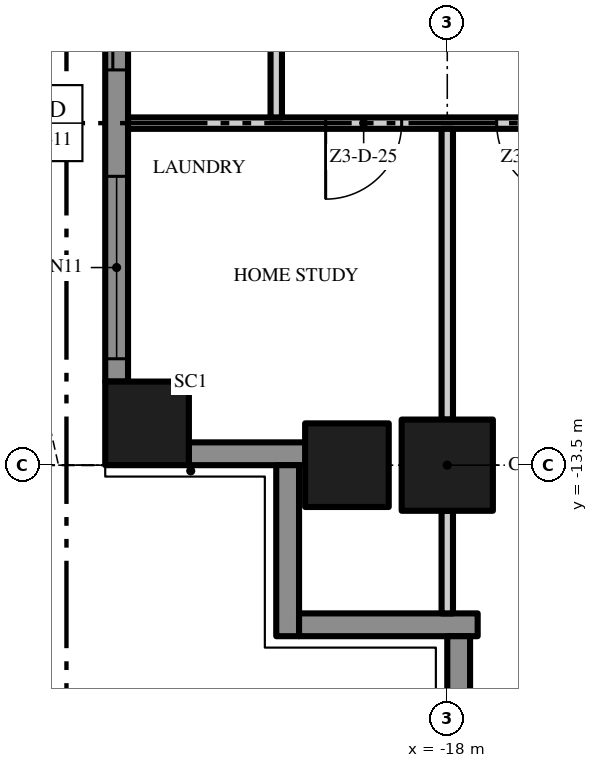
"""IFC4 building model, lengths in metres.
Left out: names, types, materials, properties, quantities, classifications, styles, units other than length and angle.
Written with IfcOpenShell. Run it as: python <this file> out.ifc"""

import sys

from ifc_helpers import new_model, si_unit, direction, frame, frame_2d, origin, origin_2d, place, context, subcontext, project, spatial, polyline, rectangle, outline, extrude, element, fill, save


model = new_model("IFC4")
c1 = context("Model", 3, precision=1e-05, world=origin(), true_north=direction((0.0, 1.0)))
c2 = subcontext(c1, "Body", "Model", "MODEL_VIEW")
j1 = project(units=[si_unit("LENGTHUNIT", "METRE"), si_unit("PLANEANGLEUNIT", "RADIAN")], contexts=[c1])
p1 = place(None, origin())
s1 = spatial("IfcSite", under=j1, at=p1, CompositionType="ELEMENT")
p2 = place(p1, origin())
s2 = spatial("IfcBuilding", under=s1, at=p2, CompositionType="ELEMENT")
p3 = place(p2, frame((0.0, 0.0, 163.0)))
s3 = spatial("IfcBuildingStorey", under=s2, at=p3, CompositionType="ELEMENT", Elevation=163.0)
p4 = place(p3, frame((-18.0, -13.5, 0.0), z_axis=(0.0, 0.0, 1.0), x_axis=(1.0, 0.0, 0.0)))
e1 = element("IfcColumn", 1, at=p4, inside=s3, PredefinedType="COLUMN", context=c2, shape_type="SweptSolid", body=[
    extrude(rectangle(XDim=1.2, YDim=1.2, at=origin_2d()), origin(), (0.0, 0.0, 1.0), 3.5),
])
for number, where, z_axis, x_axis in (
    (2, (-21.95, -12.95, 0.0), (0.0, 0.0, 1.0), (1.0, 0.0, 0.0)),
    (3, (-19.32, -13.5, 0.0), (0.0, 0.0, 1.0), (1.0, 0.0, 0.0)),
):
    element("IfcColumn", number, at=place(p3, frame(where, z_axis=z_axis, x_axis=x_axis)), inside=s3, PredefinedType="COLUMN", context=c2, shape_type="SweptSolid", body=[
        extrude(rectangle(XDim=1.1, YDim=1.1, at=origin_2d()), origin(), (0.0, 0.0, 1.0), 3.5),
    ])
p5 = place(p3, frame((-22.35, -12.4, 0.0), z_axis=(0.0, 0.0, 1.0), x_axis=(0.0, 1.0, 0.0)))
e4 = element("IfcWall", 4, at=p5, inside=s3, PredefinedType="SOLIDWALL", context=c2, shape_type="SweptSolid", body=[
    extrude(rectangle(XDim=7.35, YDim=0.3, at=frame_2d((3.675, 0.0))), origin(), (0.0, 0.0, 1.0), 3.5),
])
p6 = place(p5, frame((4.1, 0.0, 0.0)))
e5 = element("IfcOpeningElement", 5, at=p6, cuts=e4, PredefinedType="OPENING", context=c2, shape_type="SweptSolid", body=[
    extrude(rectangle(XDim=2.95, YDim=2.4, at=frame_2d((1.475, 1.2))), frame((0.0, 0.16, 0.0), z_axis=(0.0, -1.0, 0.0), x_axis=(1.0, 0.0, 0.0)), (0.0, 0.0, 1.0), 0.32),
])
p7 = place(p5, frame((0.3, 0.0, 0.45)))
e6 = element("IfcOpeningElement", 6, at=p7, cuts=e4, PredefinedType="OPENING", context=c2, shape_type="SweptSolid", body=[
    extrude(rectangle(XDim=2.4, YDim=2.65, at=frame_2d((1.2, 1.325))), frame((0.0, 0.16, 0.0), z_axis=(0.0, -1.0, 0.0), x_axis=(1.0, 0.0, 0.0)), (0.0, 0.0, 1.0), 0.32),
])
p8 = place(p3, frame((-19.85, -13.35, 0.0), z_axis=(0.0, 0.0, 1.0), x_axis=(-1.0, 0.0, 0.0)))
e7 = element("IfcWall", 7, at=p8, inside=s3, PredefinedType="SOLIDWALL", context=c2, shape_type="SweptSolid", body=[
    extrude(rectangle(XDim=1.55, YDim=0.3, at=frame_2d((0.775, 0.0))), origin(), (0.0, 0.0, 1.0), 3.5),
])
p9 = place(p3, frame((-20.1, -15.75, 0.0), z_axis=(0.0, 0.0, 1.0), x_axis=(0.0, 1.0, 0.0)))
e8 = element("IfcWall", 8, at=p9, inside=s3, PredefinedType="SOLIDWALL", context=c2, shape_type="SweptSolid", body=[
    extrude(rectangle(XDim=2.25, YDim=0.3, at=frame_2d((1.125, 0.0))), origin(), (0.0, 0.0, 1.0), 3.5),
])
p10 = place(p3, frame((-17.6, -15.6, 0.0), z_axis=(0.0, 0.0, 1.0), x_axis=(-1.0, 0.0, 0.0)))
e9 = element("IfcWall", 9, at=p10, inside=s3, PredefinedType="SOLIDWALL", context=c2, shape_type="SweptSolid", body=[
    extrude(rectangle(XDim=2.35, YDim=0.3, at=frame_2d((1.175, 0.0))), origin(), (0.0, 0.0, 1.0), 3.5),
])
p11 = place(p3, frame((-17.85, -16.9, 0.0), z_axis=(0.0, 0.0, 1.0), x_axis=(0.0, 1.0, 0.0)))
e10 = element("IfcWall", 10, at=p11, inside=s3, PredefinedType="SOLIDWALL", context=c2, shape_type="SweptSolid", body=[
    extrude(rectangle(XDim=1.15, YDim=0.3, at=frame_2d((0.575, 0.0))), origin(), (0.0, 0.0, 1.0), 3.5),
])
p12 = place(p3, origin())
e11 = element("IfcWall", 11, at=p12, inside=s3, PredefinedType="USERDEFINED", context=c2, shape_type="SweptSolid", body=[
    extrude(outline(polyline([(-23.451, 18.0), (-23.115, 16.5), (-23.1, 16.125), (-23.231, 15.0), (-23.755, 13.5), (-24.488, 12.0), (-25.149, 10.5), (-25.485, 9.0), (-25.5, 8.625), (-25.369, 7.5), (-24.845, 6.0), (-24.112, 4.5), (-23.451, 3.0), (-23.115, 1.5), (-23.1, 1.125), (-23.231, 0.0), (-23.755, -1.5), (-24.488, -3.0), (-25.149, -4.5), (-25.485, -6.0), (-25.5, -6.375), (-25.369, -7.5), (-24.845, -9.0), (-24.112, -10.5), (-23.451, -12.0), (-23.115, -13.5), (-22.871, -13.445), (-23.213, -11.921), (-23.885, -10.395), (-24.614, -8.904), (-25.124, -7.444), (-25.249, -6.365), (-25.236, -6.033), (-24.91, -4.579), (-24.261, -3.105), (-23.524, -1.596), (-22.986, -0.056), (-22.849, 1.115), (-22.866, 1.533), (-23.213, 3.079), (-23.885, 4.605), (-24.614, 6.096), (-25.124, 7.556), (-25.249, 8.635), (-25.236, 8.967), (-24.91, 10.421), (-24.261, 11.895), (-23.524, 13.404), (-22.986, 14.944), (-22.849, 16.115), (-22.866, 16.533), (-23.208, 18.055), (-23.451, 18.0)])), origin(), (0.0, 0.0, 1.0), 0.9),
])
p13 = place(p3, frame((-15.825, -9.0, 0.0), z_axis=(0.0, 0.0, 1.0), x_axis=(-1.0, 0.0, 0.0)))
e12 = element("IfcWall", 12, at=p13, inside=s3, PredefinedType="PARTITIONING", context=c2, shape_type="SweptSolid", body=[
    extrude(rectangle(XDim=6.375, YDim=0.15, at=frame_2d((3.188, 0.0))), origin(), (0.0, 0.0, 1.0), 3.5),
])
p14 = place(p13, frame((0.525, 0.0, 0.0)))
e13 = element("IfcOpeningElement", 13, at=p14, cuts=e12, PredefinedType="OPENING", context=c2, shape_type="SweptSolid", body=[
    extrude(rectangle(XDim=1.0, YDim=2.4, at=frame_2d((0.5, 1.2))), frame((0.0, 0.085, 0.0), z_axis=(0.0, -1.0, 0.0), x_axis=(1.0, 0.0, 0.0)), (0.0, 0.0, 1.0), 0.17),
])
p15 = place(p13, frame((2.775, 0.0, 0.0)))
e14 = element("IfcOpeningElement", 14, at=p15, cuts=e12, PredefinedType="OPENING", context=c2, shape_type="SweptSolid", body=[
    extrude(rectangle(XDim=1.0, YDim=2.4, at=frame_2d((0.5, 1.2))), frame((0.0, 0.085, 0.0), z_axis=(0.0, -1.0, 0.0), x_axis=(1.0, 0.0, 0.0)), (0.0, 0.0, 1.0), 0.17),
])
p16 = place(p3, frame((-20.25, -8.925, 0.0), z_axis=(0.0, 0.0, 1.0), x_axis=(0.0, 1.0, 0.0)))
e15 = element("IfcWall", 15, at=p16, inside=s3, PredefinedType="PARTITIONING", context=c2, shape_type="SweptSolid", body=[
    extrude(rectangle(XDim=4.5, YDim=0.15, at=frame_2d((2.25, 0.0))), origin(), (0.0, 0.0, 1.0), 3.5),
])
p17 = place(p16, frame((1.75, 0.0, 0.0)))
e16 = element("IfcOpeningElement", 16, at=p17, cuts=e15, PredefinedType="OPENING", context=c2, shape_type="SweptSolid", body=[
    extrude(rectangle(XDim=0.9, YDim=2.1, at=frame_2d((0.45, 1.05))), frame((0.0, 0.085, 0.0), z_axis=(0.0, -1.0, 0.0), x_axis=(1.0, 0.0, 0.0)), (0.0, 0.0, 1.0), 0.17),
])
p18 = place(p3, frame((-18.0, -15.45, 0.0), z_axis=(0.0, 0.0, 1.0), x_axis=(0.0, 1.0, 0.0)))
e17 = element("IfcWall", 17, at=p18, inside=s3, PredefinedType="PARTITIONING", context=c2, shape_type="SweptSolid", body=[
    extrude(rectangle(XDim=1.35, YDim=0.15, at=frame_2d((0.675, 0.0))), origin(), (0.0, 0.0, 1.0), 3.5),
])
p19 = place(p3, frame((-18.0, -12.9, 0.0), z_axis=(0.0, 0.0, 1.0), x_axis=(0.0, 1.0, 0.0)))
e18 = element("IfcWall", 18, at=p19, inside=s3, PredefinedType="PARTITIONING", context=c2, shape_type="SweptSolid", body=[
    extrude(rectangle(XDim=3.825, YDim=0.15, at=frame_2d((1.913, 0.0))), origin(), (0.0, 0.0, 1.0), 3.5),
])
p20 = place(p6, origin())
e19 = element("IfcDoor", 19, at=p20, inside=s3, OperationType="SINGLE_SWING_LEFT", PredefinedType="DOOR", context=c2, shape_type="SweptSolid", body=[
    extrude(rectangle(XDim=2.95, YDim=2.4, at=frame_2d((1.475, 1.2))), frame((0.0, 0.025, 0.0), z_axis=(0.0, -1.0, 0.0), x_axis=(1.0, 0.0, 0.0)), (0.0, 0.0, 1.0), 0.05),
])
fill(e5, e19)
p21 = place(p7, origin())
e20 = element("IfcWindow", 20, at=p21, inside=s3, PartitioningType="SINGLE_PANEL", PredefinedType="WINDOW", context=c2, shape_type="SweptSolid", body=[
    extrude(rectangle(XDim=2.4, YDim=2.65, at=frame_2d((1.2, 1.325))), frame((0.0, 0.03, 0.0), z_axis=(0.0, -1.0, 0.0), x_axis=(1.0, 0.0, 0.0)), (0.0, 0.0, 1.0), 0.06),
])
fill(e6, e20)
p22 = place(p14, origin())
e21 = element("IfcDoor", 21, at=p22, inside=s3, OperationType="SINGLE_SWING_LEFT", PredefinedType="DOOR", context=c2, shape_type="SweptSolid", body=[
    extrude(rectangle(XDim=1.0, YDim=2.4, at=frame_2d((0.5, 1.2))), frame((0.0, 0.025, 0.0), z_axis=(0.0, -1.0, 0.0), x_axis=(1.0, 0.0, 0.0)), (0.0, 0.0, 1.0), 0.05),
])
fill(e13, e21)
p23 = place(p15, origin())
e22 = element("IfcDoor", 22, at=p23, inside=s3, OperationType="SINGLE_SWING_RIGHT", PredefinedType="DOOR", context=c2, shape_type="SweptSolid", body=[
    extrude(rectangle(XDim=1.0, YDim=2.4, at=frame_2d((0.5, 1.2))), frame((0.0, 0.025, 0.0), z_axis=(0.0, -1.0, 0.0), x_axis=(1.0, 0.0, 0.0)), (0.0, 0.0, 1.0), 0.05),
])
fill(e14, e22)
save(model, sys.argv[1])
